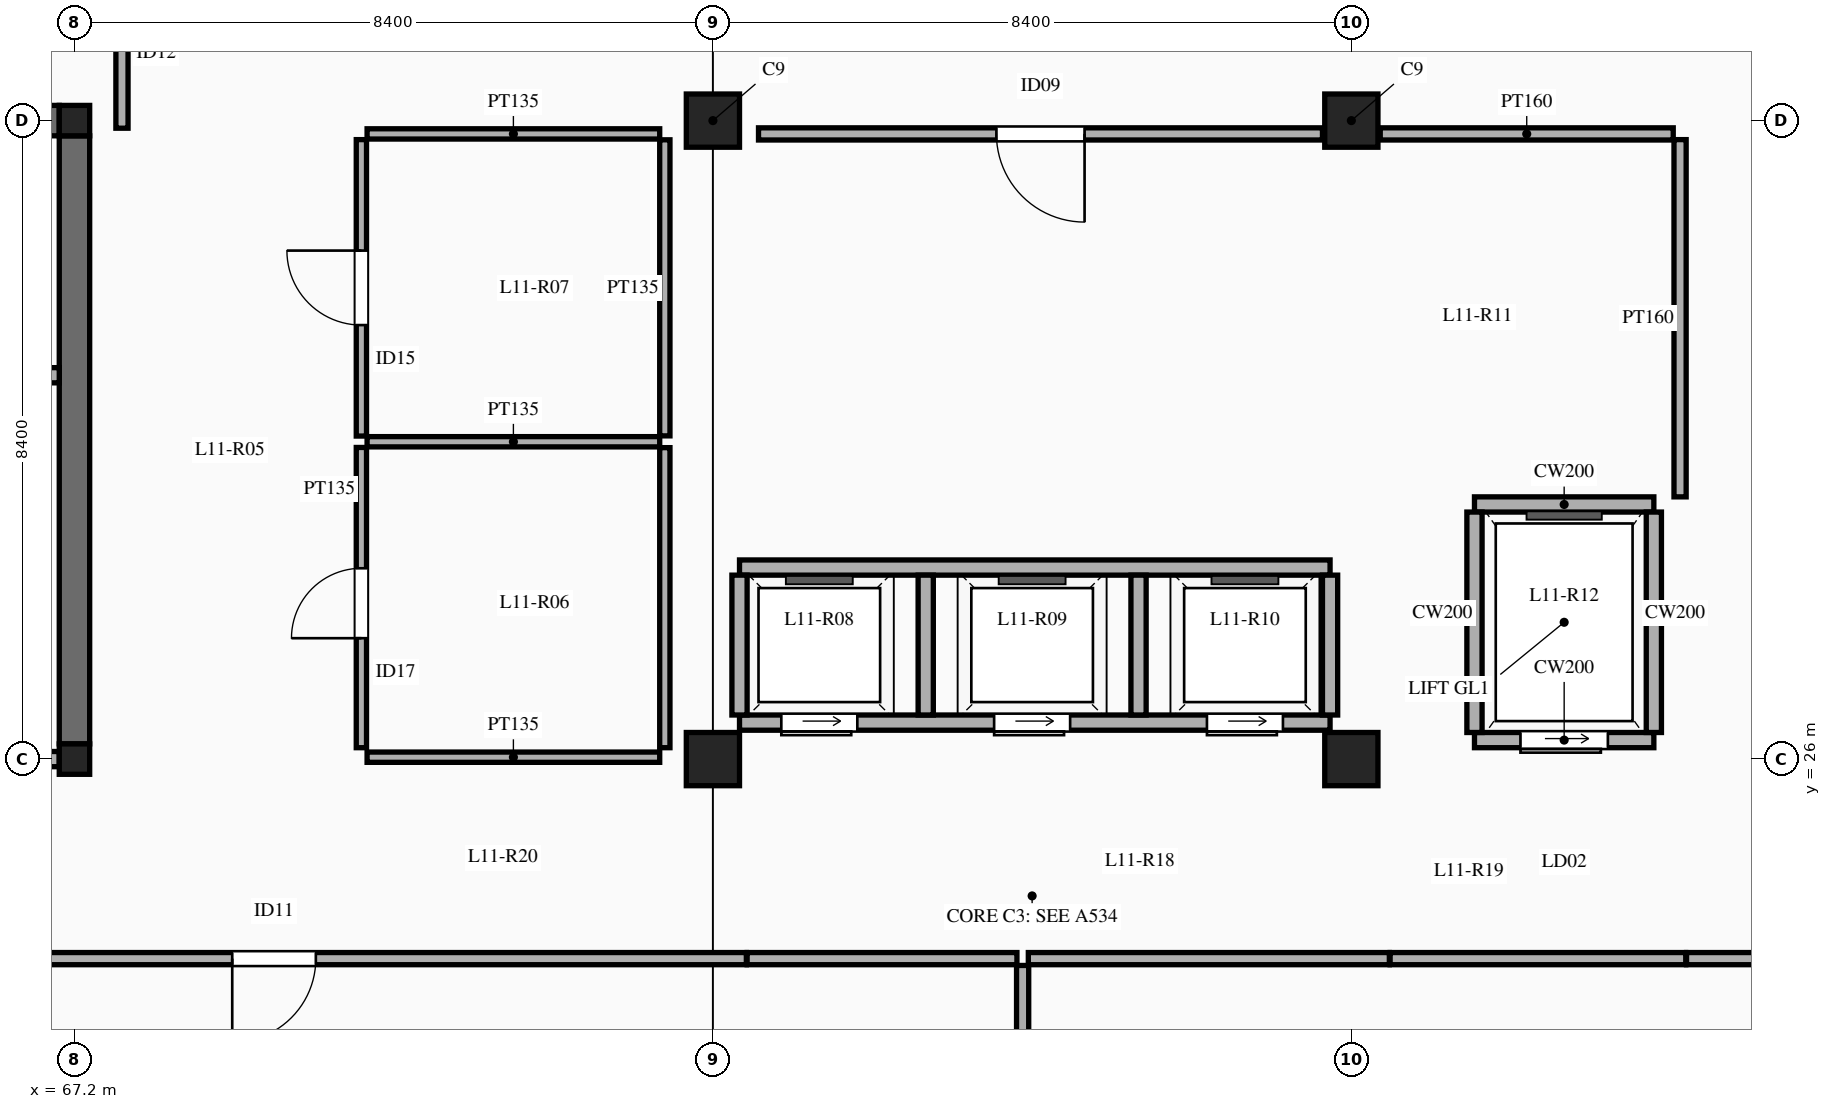
"""IFC4 building model, lengths in metres.
Left out: names, types, materials, properties, quantities, classifications, styles, units other than length and angle.
Written with IfcOpenShell. Run it as: python <this file> out.ifc"""

import sys

from ifc_helpers import new_model, si_unit, direction, frame, frame_2d, origin, origin_2d, place, context, subcontext, project, spatial, rectangle, extrude, element, fill, save


model = new_model("IFC4")
c1 = context("Model", 3, precision=1e-05, world=origin(), true_north=direction((0.0, 1.0)))
c2 = subcontext(c1, "Body", "Model", "MODEL_VIEW")
j1 = project(units=[si_unit("LENGTHUNIT", "METRE"), si_unit("PLANEANGLEUNIT", "RADIAN")], contexts=[c1])
p1 = place(None, origin())
s1 = spatial("IfcSite", under=j1, at=p1, CompositionType="ELEMENT")
p2 = place(p1, origin())
s2 = spatial("IfcBuilding", under=s1, at=p2, CompositionType="ELEMENT")
p3 = place(p2, frame((0.0, 0.0, 51.0)))
s3 = spatial("IfcBuildingStorey", under=s2, at=p3, CompositionType="ELEMENT", Elevation=51.0)
for number, where, z_axis, x_axis in (
    (1, (67.2, 26.0, 0.0), (0.0, 0.0, 1.0), (1.0, 0.0, 0.0)),
    (2, (67.2, 34.4, 0.0), (0.0, 0.0, 1.0), (1.0, 0.0, 0.0)),
):
    element("IfcColumn", number, at=place(p3, frame(where, z_axis=z_axis, x_axis=x_axis)), inside=s3, PredefinedType="COLUMN", context=c2, shape_type="SweptSolid", body=[
        extrude(rectangle(XDim=0.4, YDim=0.4, at=origin_2d()), origin(), (0.0, 0.0, 1.0), 4.5),
    ])
for number, where, z_axis, x_axis in (
    (3, (75.6, 26.0, 0.0), (0.0, 0.0, 1.0), (1.0, 0.0, 0.0)),
    (4, (75.6, 34.4, 0.0), (0.0, 0.0, 1.0), (1.0, 0.0, 0.0)),
    (5, (84.0, 26.0, 0.0), (0.0, 0.0, 1.0), (1.0, 0.0, 0.0)),
    (6, (84.0, 34.4, 0.0), (0.0, 0.0, 1.0), (1.0, 0.0, 0.0)),
):
    element("IfcColumn", number, at=place(p3, frame(where, z_axis=z_axis, x_axis=x_axis)), inside=s3, PredefinedType="COLUMN", context=c2, shape_type="SweptSolid", body=[
        extrude(rectangle(XDim=0.7, YDim=0.7, at=origin_2d()), origin(), (0.0, 0.0, 1.0), 4.5),
    ])
for number, where, z_axis, x_axis in (
    (7, (67.2, 26.2, 0.0), (0.0, 0.0, 1.0), (0.0, 1.0, 0.0)),
    (8, (59.0, 34.4, 0.0), (0.0, 0.0, 1.0), (1.0, 0.0, 0.0)),
):
    element("IfcWall", number, at=place(p3, frame(where, z_axis=z_axis, x_axis=x_axis)), inside=s3, PredefinedType="SHEAR", context=c2, shape_type="SweptSolid", body=[
        extrude(rectangle(XDim=8.0, YDim=0.4, at=frame_2d((4.0, 0.0))), origin(), (0.0, 0.0, 1.0), 4.5),
    ])
p4 = place(p3, frame((59.0, 26.0, 0.0), z_axis=(0.0, 0.0, 1.0), x_axis=(1.0, 0.0, 0.0)))
e9 = element("IfcWall", 9, at=p4, inside=s3, PredefinedType="SOLIDWALL", context=c2, shape_type="SweptSolid", body=[
    extrude(rectangle(XDim=8.0, YDim=0.2, at=frame_2d((4.0, 0.0))), origin(), (0.0, 0.0, 1.0), 3.83),
])
p5 = place(p4, frame((1.55, 0.0, 0.0)))
e10 = element("IfcOpeningElement", 10, at=p5, cuts=e9, PredefinedType="OPENING", context=c2, shape_type="SweptSolid", body=[
    extrude(rectangle(XDim=1.15, YDim=2.15, at=frame_2d((0.575, 1.075))), frame((0.0, 0.11, 0.0), z_axis=(0.0, -1.0, 0.0), x_axis=(1.0, 0.0, 0.0)), (0.0, 0.0, 1.0), 0.22),
])
p6 = place(p4, frame((5.35, 0.0, 0.0)))
e11 = element("IfcOpeningElement", 11, at=p6, cuts=e9, PredefinedType="OPENING", context=c2, shape_type="SweptSolid", body=[
    extrude(rectangle(XDim=1.22, YDim=2.15, at=frame_2d((0.61, 1.075))), frame((0.0, 0.11, 0.0), z_axis=(0.0, -1.0, 0.0), x_axis=(1.0, 0.0, 0.0)), (0.0, 0.0, 1.0), 0.22),
])
p7 = place(p3, frame((63.05, 31.05, 0.0), z_axis=(0.0, 0.0, 1.0), x_axis=(1.0, 0.0, 0.0)))
e12 = element("IfcWall", 12, at=p7, inside=s3, PredefinedType="SOLIDWALL", context=c2, shape_type="SweptSolid", body=[
    extrude(rectangle(XDim=3.95, YDim=0.2, at=frame_2d((1.975, 0.0))), origin(), (0.0, 0.0, 1.0), 4.3),
])
p8 = place(p7, frame((1.4, 0.0, 0.0)))
e13 = element("IfcOpeningElement", 13, at=p8, cuts=e12, PredefinedType="OPENING", context=c2, shape_type="SweptSolid", body=[
    extrude(rectangle(XDim=1.1, YDim=2.15, at=frame_2d((0.55, 1.075))), frame((0.0, 0.11, 0.0), z_axis=(0.0, -1.0, 0.0), x_axis=(1.0, 0.0, 0.0)), (0.0, 0.0, 1.0), 0.22),
])
p9 = place(p3, frame((75.95, 26.48, 0.0), z_axis=(0.0, 0.0, 1.0), x_axis=(1.0, 0.0, 0.0)))
e14 = element("IfcWall", 14, at=p9, inside=s3, PredefinedType="SOLIDWALL", context=c2, shape_type="SweptSolid", body=[
    extrude(rectangle(XDim=7.77, YDim=0.2, at=frame_2d((3.885, 0.0))), origin(), (0.0, 0.0, 1.0), 4.3),
])
p10 = place(p9, frame((0.55, 0.0, 0.0)))
e15 = element("IfcOpeningElement", 15, at=p10, cuts=e14, PredefinedType="OPENING", context=c2, shape_type="SweptSolid", body=[
    extrude(rectangle(XDim=1.0, YDim=2.15, at=frame_2d((0.5, 1.075))), frame((0.0, 0.11, 0.0), z_axis=(0.0, -1.0, 0.0), x_axis=(1.0, 0.0, 0.0)), (0.0, 0.0, 1.0), 0.22),
])
p11 = place(p9, frame((3.35, 0.0, 0.0)))
e16 = element("IfcOpeningElement", 16, at=p11, cuts=e14, PredefinedType="OPENING", context=c2, shape_type="SweptSolid", body=[
    extrude(rectangle(XDim=1.0, YDim=2.15, at=frame_2d((0.5, 1.075))), frame((0.0, 0.11, 0.0), z_axis=(0.0, -1.0, 0.0), x_axis=(1.0, 0.0, 0.0)), (0.0, 0.0, 1.0), 0.22),
])
p12 = place(p9, frame((6.15, 0.0, 0.0)))
e17 = element("IfcOpeningElement", 17, at=p12, cuts=e14, PredefinedType="OPENING", context=c2, shape_type="SweptSolid", body=[
    extrude(rectangle(XDim=1.0, YDim=2.15, at=frame_2d((0.5, 1.075))), frame((0.0, 0.11, 0.0), z_axis=(0.0, -1.0, 0.0), x_axis=(1.0, 0.0, 0.0)), (0.0, 0.0, 1.0), 0.22),
])
p13 = place(p3, frame((75.95, 28.52, 0.0), z_axis=(0.0, 0.0, 1.0), x_axis=(1.0, 0.0, 0.0)))
e18 = element("IfcWall", 18, at=p13, inside=s3, PredefinedType="SOLIDWALL", context=c2, shape_type="SweptSolid", body=[
    extrude(rectangle(XDim=7.77, YDim=0.2, at=frame_2d((3.885, 0.0))), origin(), (0.0, 0.0, 1.0), 4.3),
])
for number, where, z_axis, x_axis in (
    (19, (75.95, 26.58, 0.0), (0.0, 0.0, 1.0), (0.0, 1.0, 0.0)),
    (20, (78.4, 26.58, 0.0), (0.0, 0.0, 1.0), (0.0, 1.0, 0.0)),
    (21, (81.2, 26.58, 0.0), (0.0, 0.0, 1.0), (0.0, 1.0, 0.0)),
):
    element("IfcWall", number, at=place(p3, frame(where, z_axis=z_axis, x_axis=x_axis)), inside=s3, PredefinedType="SOLIDWALL", context=c2, shape_type="SweptSolid", body=[
        extrude(rectangle(XDim=1.84, YDim=0.2, at=frame_2d((0.92, 0.0))), origin(), (0.0, 0.0, 1.0), 4.3),
    ])
p14 = place(p3, frame((83.72, 26.58, 0.0), z_axis=(0.0, 0.0, 1.0), x_axis=(0.0, 1.0, 0.0)))
e22 = element("IfcWall", 22, at=p14, inside=s3, PredefinedType="SOLIDWALL", context=c2, shape_type="SweptSolid", body=[
    extrude(rectangle(XDim=1.84, YDim=0.2, at=frame_2d((0.92, 0.0))), origin(), (0.0, 0.0, 1.0), 3.88),
])
p15 = place(p3, frame((85.62, 26.25, 0.0), z_axis=(0.0, 0.0, 1.0), x_axis=(1.0, 0.0, 0.0)))
e23 = element("IfcWall", 23, at=p15, inside=s3, PredefinedType="SOLIDWALL", context=c2, shape_type="SweptSolid", body=[
    extrude(rectangle(XDim=2.36, YDim=0.2, at=frame_2d((1.18, 0.0))), origin(), (0.0, 0.0, 1.0), 3.83),
])
p16 = place(p15, frame((0.605, 0.0, 0.0)))
e24 = element("IfcOpeningElement", 24, at=p16, cuts=e23, PredefinedType="OPENING", context=c2, shape_type="SweptSolid", body=[
    extrude(rectangle(XDim=1.15, YDim=2.2, at=frame_2d((0.575, 1.1))), frame((0.0, 0.11, 0.0), z_axis=(0.0, -1.0, 0.0), x_axis=(1.0, 0.0, 0.0)), (0.0, 0.0, 1.0), 0.22),
])
p17 = place(p3, frame((85.62, 29.35, 0.0), z_axis=(0.0, 0.0, 1.0), x_axis=(1.0, 0.0, 0.0)))
e25 = element("IfcWall", 25, at=p17, inside=s3, PredefinedType="SOLIDWALL", context=c2, shape_type="SweptSolid", body=[
    extrude(rectangle(XDim=2.36, YDim=0.2, at=frame_2d((1.18, 0.0))), origin(), (0.0, 0.0, 1.0), 4.3),
])
p18 = place(p3, frame((85.62, 26.35, 0.0), z_axis=(0.0, 0.0, 1.0), x_axis=(0.0, 1.0, 0.0)))
e26 = element("IfcWall", 26, at=p18, inside=s3, PredefinedType="SOLIDWALL", context=c2, shape_type="SweptSolid", body=[
    extrude(rectangle(XDim=2.9, YDim=0.2, at=frame_2d((1.45, 0.0))), origin(), (0.0, 0.0, 1.0), 4.3),
])
p19 = place(p3, frame((87.98, 26.35, 0.0), z_axis=(0.0, 0.0, 1.0), x_axis=(0.0, 1.0, 0.0)))
e27 = element("IfcWall", 27, at=p19, inside=s3, PredefinedType="SOLIDWALL", context=c2, shape_type="SweptSolid", body=[
    extrude(rectangle(XDim=2.9, YDim=0.2, at=frame_2d((1.45, 0.0))), origin(), (0.0, 0.0, 1.0), 4.03),
])
p20 = place(p3, frame((70.975, 26.15, 0.0), z_axis=(0.0, 0.0, 1.0), x_axis=(0.0, 1.0, 0.0)))
e28 = element("IfcWall", 28, at=p20, inside=s3, PredefinedType="PARTITIONING", context=c2, shape_type="SweptSolid", body=[
    extrude(rectangle(XDim=3.95, YDim=0.135, at=frame_2d((1.975, 0.0))), origin(), (0.0, 0.0, 1.0), 3.45),
])
p21 = place(p20, frame((1.441, 0.0, 0.0)))
e29 = element("IfcOpeningElement", 29, at=p21, cuts=e28, PredefinedType="OPENING", context=c2, shape_type="SweptSolid", body=[
    extrude(rectangle(XDim=0.92, YDim=2.12, at=frame_2d((0.46, 1.06))), frame((0.0, 0.077, 0.0), z_axis=(0.0, -1.0, 0.0), x_axis=(1.0, 0.0, 0.0)), (0.0, 0.0, 1.0), 0.155),
])
p22 = place(p3, frame((70.975, 30.25, 0.0), z_axis=(0.0, 0.0, 1.0), x_axis=(0.0, 1.0, 0.0)))
e30 = element("IfcWall", 30, at=p22, inside=s3, PredefinedType="PARTITIONING", context=c2, shape_type="SweptSolid", body=[
    extrude(rectangle(XDim=3.9, YDim=0.135, at=frame_2d((1.95, 0.0))), origin(), (0.0, 0.0, 1.0), 3.45),
])
p23 = place(p22, frame((1.46, 0.0, 0.0)))
e31 = element("IfcOpeningElement", 31, at=p23, cuts=e30, PredefinedType="OPENING", context=c2, shape_type="SweptSolid", body=[
    extrude(rectangle(XDim=0.98, YDim=2.15, at=frame_2d((0.49, 1.075))), frame((0.0, 0.077, 0.0), z_axis=(0.0, -1.0, 0.0), x_axis=(1.0, 0.0, 0.0)), (0.0, 0.0, 1.0), 0.155),
])
for number, where, z_axis, x_axis in (
    (32, (71.05, 30.175, 0.0), (0.0, 0.0, 1.0), (1.0, 0.0, 0.0)),
    (33, (71.05, 26.025, 0.0), (0.0, 0.0, 1.0), (1.0, 0.0, 0.0)),
    (34, (71.05, 34.225, 0.0), (0.0, 0.0, 1.0), (1.0, 0.0, 0.0)),
):
    element("IfcWall", number, at=place(p3, frame(where, z_axis=z_axis, x_axis=x_axis)), inside=s3, PredefinedType="PARTITIONING", context=c2, shape_type="SweptSolid", body=[
        extrude(rectangle(XDim=3.85, YDim=0.135, at=frame_2d((1.925, 0.0))), origin(), (0.0, 0.0, 1.0), 3.45),
    ])
p24 = place(p3, frame((88.325, 29.45, 0.0), z_axis=(0.0, 0.0, 1.0), x_axis=(0.0, 1.0, 0.0)))
e35 = element("IfcWall", 35, at=p24, inside=s3, PredefinedType="PARTITIONING", context=c2, shape_type="SweptSolid", body=[
    extrude(rectangle(XDim=4.7, YDim=0.16, at=frame_2d((2.35, 0.0))), origin(), (0.0, 0.0, 1.0), 3.45),
])
p25 = place(p3, frame((76.2, 34.225, 0.0), z_axis=(0.0, 0.0, 1.0), x_axis=(1.0, 0.0, 0.0)))
e36 = element("IfcWall", 36, at=p25, inside=s3, PredefinedType="PARTITIONING", context=c2, shape_type="SweptSolid", body=[
    extrude(rectangle(XDim=7.42, YDim=0.16, at=frame_2d((3.71, 0.0))), origin(), (0.0, 0.0, 1.0), 3.45),
])
p26 = place(p25, frame((3.13, 0.0, 0.0)))
e37 = element("IfcOpeningElement", 37, at=p26, cuts=e36, PredefinedType="OPENING", context=c2, shape_type="SweptSolid", body=[
    extrude(rectangle(XDim=1.16, YDim=2.2, at=frame_2d((0.58, 1.1))), frame((0.0, 0.09, 0.0), z_axis=(0.0, -1.0, 0.0), x_axis=(1.0, 0.0, 0.0)), (0.0, 0.0, 1.0), 0.18),
])
p27 = place(p3, frame((84.38, 34.225, 0.0), z_axis=(0.0, 0.0, 1.0), x_axis=(1.0, 0.0, 0.0)))
e38 = element("IfcWall", 38, at=p27, inside=s3, PredefinedType="PARTITIONING", context=c2, shape_type="SweptSolid", body=[
    extrude(rectangle(XDim=3.855, YDim=0.16, at=frame_2d((1.928, 0.0))), origin(), (0.0, 0.0, 1.0), 3.45),
])
p28 = place(p3, frame((76.05, 23.375, 0.0), z_axis=(0.0, 0.0, 1.0), x_axis=(1.0, 0.0, 0.0)))
e39 = element("IfcWall", 39, at=p28, inside=s3, PredefinedType="PARTITIONING", context=c2, shape_type="SweptSolid", body=[
    extrude(rectangle(XDim=3.55, YDim=0.16, at=frame_2d((1.775, 0.0))), origin(), (0.0, 0.0, 1.0), 3.45),
])
p29 = place(p3, frame((79.75, 23.375, 0.0), z_axis=(0.0, 0.0, 1.0), x_axis=(1.0, 0.0, 0.0)))
e40 = element("IfcWall", 40, at=p29, inside=s3, PredefinedType="PARTITIONING", context=c2, shape_type="SweptSolid", body=[
    extrude(rectangle(XDim=4.75, YDim=0.16, at=frame_2d((2.375, 0.0))), origin(), (0.0, 0.0, 1.0), 3.45),
])
p30 = place(p3, frame((84.51, 23.375, 0.0), z_axis=(0.0, 0.0, 1.0), x_axis=(1.0, 0.0, 0.0)))
e41 = element("IfcWall", 41, at=p30, inside=s3, PredefinedType="PARTITIONING", context=c2, shape_type="SweptSolid", body=[
    extrude(rectangle(XDim=3.89, YDim=0.16, at=frame_2d((1.945, 0.0))), origin(), (0.0, 0.0, 1.0), 3.45),
])
p31 = place(p3, frame((59.25, 23.375, 0.0), z_axis=(0.0, 0.0, 1.0), x_axis=(1.0, 0.0, 0.0)))
e42 = element("IfcWall", 42, at=p31, inside=s3, PredefinedType="PARTITIONING", context=c2, shape_type="SweptSolid", body=[
    extrude(rectangle(XDim=16.79, YDim=0.16, at=frame_2d((8.395, 0.0))), origin(), (0.0, 0.0, 1.0), 3.45),
])
p32 = place(p31, frame((10.026, 0.0, 0.0)))
e43 = element("IfcOpeningElement", 43, at=p32, cuts=e42, PredefinedType="OPENING", context=c2, shape_type="SweptSolid", body=[
    extrude(rectangle(XDim=1.1, YDim=2.2, at=frame_2d((0.55, 1.1))), frame((0.0, 0.09, 0.0), z_axis=(0.0, -1.0, 0.0), x_axis=(1.0, 0.0, 0.0)), (0.0, 0.0, 1.0), 0.18),
])
p33 = place(p3, frame((88.41, 23.375, 0.0), z_axis=(0.0, 0.0, 1.0), x_axis=(1.0, 0.0, 0.0)))
e44 = element("IfcWall", 44, at=p33, inside=s3, PredefinedType="PARTITIONING", context=c2, shape_type="SweptSolid", body=[
    extrude(rectangle(XDim=11.94, YDim=0.16, at=frame_2d((5.97, 0.0))), origin(), (0.0, 0.0, 1.0), 3.45),
])
p34 = place(p33, frame((6.06, 0.0, 0.0)))
e45 = element("IfcOpeningElement", 45, at=p34, cuts=e44, PredefinedType="OPENING", context=c2, shape_type="SweptSolid", body=[
    extrude(rectangle(XDim=1.16, YDim=2.2, at=frame_2d((0.58, 1.1))), frame((0.0, 0.09, 0.0), z_axis=(0.0, -1.0, 0.0), x_axis=(1.0, 0.0, 0.0)), (0.0, 0.0, 1.0), 0.18),
])
p35 = place(p3, frame((79.675, 9.65, 0.0), z_axis=(0.0, 0.0, 1.0), x_axis=(0.0, 1.0, 0.0)))
e46 = element("IfcWall", 46, at=p35, inside=s3, PredefinedType="PARTITIONING", context=c2, shape_type="SweptSolid", body=[
    extrude(rectangle(XDim=13.635, YDim=0.16, at=frame_2d((6.817, 0.0))), origin(), (0.0, 0.0, 1.0), 3.45),
])
p36 = place(p3, frame((67.825, 34.3, 0.0), z_axis=(0.0, 0.0, 1.0), x_axis=(0.0, 1.0, 0.0)))
e47 = element("IfcWall", 47, at=p36, inside=s3, PredefinedType="PARTITIONING", context=c2, shape_type="SweptSolid", body=[
    extrude(rectangle(XDim=2.75, YDim=0.16, at=frame_2d((1.375, 0.0))), origin(), (0.0, 0.0, 1.0), 3.45),
])
p37 = place(p36, frame((1.44, 0.0, 0.0)))
e48 = element("IfcOpeningElement", 48, at=p37, cuts=e47, PredefinedType="OPENING", context=c2, shape_type="SweptSolid", body=[
    extrude(rectangle(XDim=1.06, YDim=2.18, at=frame_2d((0.53, 1.09))), frame((0.0, 0.09, 0.0), z_axis=(0.0, -1.0, 0.0), x_axis=(1.0, 0.0, 0.0)), (0.0, 0.0, 1.0), 0.18),
])
p38 = place(p3, frame((74.968, 26.15, 0.0), z_axis=(0.0, 0.0, 1.0), x_axis=(0.0, 1.0, 0.0)))
e49 = element("IfcWall", 49, at=p38, inside=s3, PredefinedType="PARTITIONING", context=c2, shape_type="SweptSolid", body=[
    extrude(rectangle(XDim=3.948, YDim=0.135, at=frame_2d((1.974, 0.0))), origin(), (0.0, 0.0, 1.0), 3.45),
])
p39 = place(p3, frame((74.968, 30.252, 0.0), z_axis=(0.0, 0.0, 1.0), x_axis=(0.0, 1.0, 0.0)))
e50 = element("IfcWall", 50, at=p39, inside=s3, PredefinedType="PARTITIONING", context=c2, shape_type="SweptSolid", body=[
    extrude(rectangle(XDim=3.895, YDim=0.135, at=frame_2d((1.948, 0.0))), origin(), (0.0, 0.0, 1.0), 3.45),
])
p40 = place(p10, frame((1.0, 0.0, 0.0), z_axis=(0.0, 0.0, 1.0), x_axis=(-1.0, 0.0, 0.0)))
e51 = element("IfcDoor", 51, at=p40, inside=s3, OperationType="SLIDING_TO_LEFT", PredefinedType="DOOR", context=c2, shape_type="SweptSolid", body=[
    extrude(rectangle(XDim=1.0, YDim=2.15, at=frame_2d((0.5, 1.075))), frame((0.0, 0.025, 0.0), z_axis=(0.0, -1.0, 0.0), x_axis=(1.0, 0.0, 0.0)), (0.0, 0.0, 1.0), 0.05),
])
fill(e15, e51)
p41 = place(p11, frame((1.0, 0.0, 0.0), z_axis=(0.0, 0.0, 1.0), x_axis=(-1.0, 0.0, 0.0)))
e52 = element("IfcDoor", 52, at=p41, inside=s3, OperationType="SLIDING_TO_LEFT", PredefinedType="DOOR", context=c2, shape_type="SweptSolid", body=[
    extrude(rectangle(XDim=1.0, YDim=2.15, at=frame_2d((0.5, 1.075))), frame((0.0, 0.025, 0.0), z_axis=(0.0, -1.0, 0.0), x_axis=(1.0, 0.0, 0.0)), (0.0, 0.0, 1.0), 0.05),
])
fill(e16, e52)
p42 = place(p12, frame((1.0, 0.0, 0.0), z_axis=(0.0, 0.0, 1.0), x_axis=(-1.0, 0.0, 0.0)))
e53 = element("IfcDoor", 53, at=p42, inside=s3, OperationType="SLIDING_TO_LEFT", PredefinedType="DOOR", context=c2, shape_type="SweptSolid", body=[
    extrude(rectangle(XDim=1.0, YDim=2.15, at=frame_2d((0.5, 1.075))), frame((0.0, 0.025, 0.0), z_axis=(0.0, -1.0, 0.0), x_axis=(1.0, 0.0, 0.0)), (0.0, 0.0, 1.0), 0.05),
])
fill(e17, e53)
p43 = place(p16, frame((1.15, 0.0, 0.0), z_axis=(0.0, 0.0, 1.0), x_axis=(-1.0, 0.0, 0.0)))
e54 = element("IfcDoor", 54, at=p43, inside=s3, OperationType="SLIDING_TO_LEFT", PredefinedType="DOOR", context=c2, shape_type="SweptSolid", body=[
    extrude(rectangle(XDim=1.15, YDim=2.2, at=frame_2d((0.575, 1.1))), frame((0.0, 0.025, 0.0), z_axis=(0.0, -1.0, 0.0), x_axis=(1.0, 0.0, 0.0)), (0.0, 0.0, 1.0), 0.05),
])
fill(e24, e54)
p44 = place(p21, origin())
e55 = element("IfcDoor", 55, at=p44, inside=s3, OperationType="SINGLE_SWING_LEFT", PredefinedType="DOOR", context=c2, shape_type="SweptSolid", body=[
    extrude(rectangle(XDim=0.92, YDim=2.12, at=frame_2d((0.46, 1.06))), frame((0.0, 0.025, 0.0), z_axis=(0.0, -1.0, 0.0), x_axis=(1.0, 0.0, 0.0)), (0.0, 0.0, 1.0), 0.05),
])
fill(e29, e55)
p45 = place(p23, origin())
e56 = element("IfcDoor", 56, at=p45, inside=s3, OperationType="SINGLE_SWING_RIGHT", PredefinedType="DOOR", context=c2, shape_type="SweptSolid", body=[
    extrude(rectangle(XDim=0.98, YDim=2.15, at=frame_2d((0.49, 1.075))), frame((0.0, 0.025, 0.0), z_axis=(0.0, -1.0, 0.0), x_axis=(1.0, 0.0, 0.0)), (0.0, 0.0, 1.0), 0.05),
])
fill(e31, e56)
p46 = place(p26, frame((1.16, 0.0, 0.0), z_axis=(0.0, 0.0, 1.0), x_axis=(-1.0, 0.0, 0.0)))
e57 = element("IfcDoor", 57, at=p46, inside=s3, OperationType="SINGLE_SWING_LEFT", PredefinedType="DOOR", context=c2, shape_type="SweptSolid", body=[
    extrude(rectangle(XDim=1.16, YDim=2.2, at=frame_2d((0.58, 1.1))), frame((0.0, 0.025, 0.0), z_axis=(0.0, -1.0, 0.0), x_axis=(1.0, 0.0, 0.0)), (0.0, 0.0, 1.0), 0.05),
])
fill(e37, e57)
p47 = place(p32, frame((1.1, 0.0, 0.0), z_axis=(0.0, 0.0, 1.0), x_axis=(-1.0, 0.0, 0.0)))
e58 = element("IfcDoor", 58, at=p47, inside=s3, OperationType="SINGLE_SWING_RIGHT", PredefinedType="DOOR", context=c2, shape_type="SweptSolid", body=[
    extrude(rectangle(XDim=1.1, YDim=2.2, at=frame_2d((0.55, 1.1))), frame((0.0, 0.025, 0.0), z_axis=(0.0, -1.0, 0.0), x_axis=(1.0, 0.0, 0.0)), (0.0, 0.0, 1.0), 0.05),
])
fill(e43, e58)
save(model, sys.argv[1])
